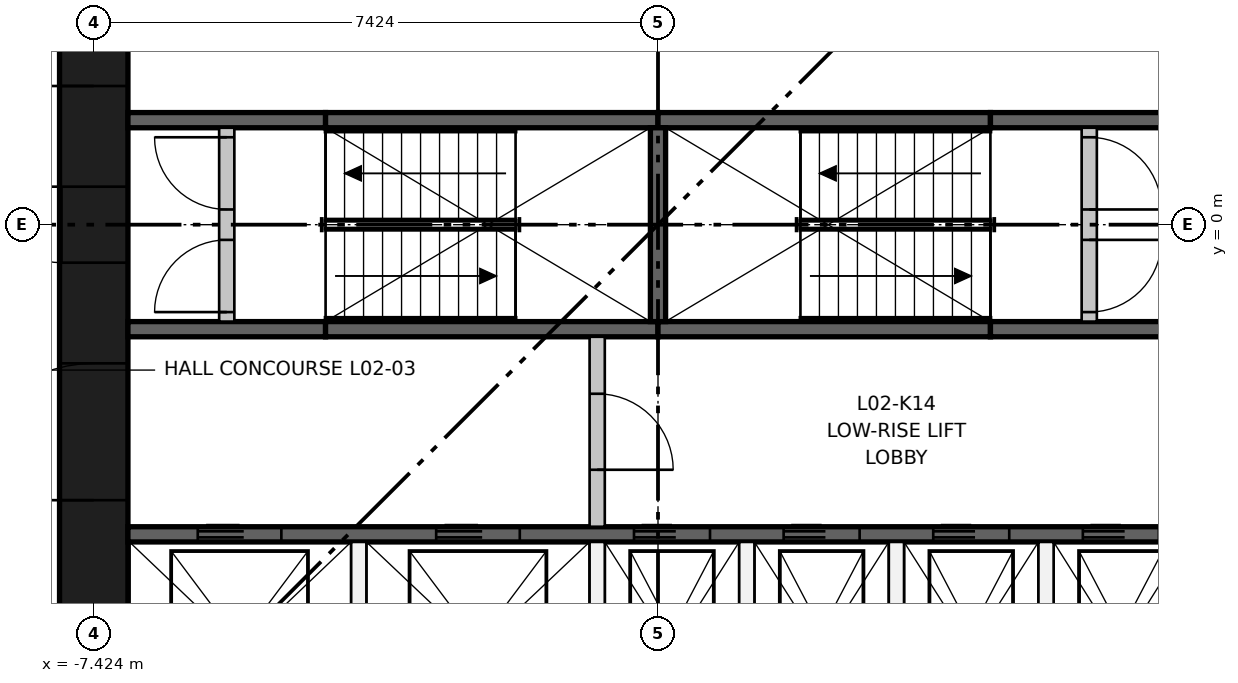
"""IFC4 building model, lengths in metres.
Left out: names, types, materials, properties, quantities, classifications, styles, units other than length and angle.
Written with IfcOpenShell. Run it as: python <this file> out.ifc"""

import sys

from ifc_helpers import new_model, si_unit, direction, frame, frame_2d, origin, place, context, subcontext, project, spatial, rectangle, extrude, element, fill, save


model = new_model("IFC4")
c1 = context("Model", 3, precision=1e-05, world=origin(), true_north=direction((0.0, 1.0)))
c2 = subcontext(c1, "Body", "Model", "MODEL_VIEW")
j1 = project(units=[si_unit("LENGTHUNIT", "METRE"), si_unit("PLANEANGLEUNIT", "RADIAN")], contexts=[c1])
p1 = place(None, origin())
s1 = spatial("IfcSite", under=j1, at=p1, CompositionType="ELEMENT")
p2 = place(p1, origin())
s2 = spatial("IfcBuilding", under=s1, at=p2, CompositionType="ELEMENT")
p3 = place(p2, frame((0.0, 0.0, 9.9)))
s3 = spatial("IfcBuildingStorey", under=s2, at=p3, CompositionType="ELEMENT", Elevation=9.9)
p4 = place(p3, frame((-7.424, -6.974, 0.0), z_axis=(0.0, 0.0, 1.0), x_axis=(0.0, 1.0, 0.0)))
e1 = element("IfcWall", 1, at=p4, inside=s3, PredefinedType="SHEAR", context=c2, shape_type="SweptSolid", body=[
    extrude(rectangle(XDim=13.948, YDim=0.9, at=frame_2d((6.974, 0.0))), origin(), (0.0, 0.0, 1.0), 4.5),
])
p5 = place(p4, frame((6.474, 0.0, 0.0)))
e2 = element("IfcOpeningElement", 2, at=p5, cuts=e1, PredefinedType="OPENING", context=c2, shape_type="SweptSolid", body=[
    extrude(rectangle(XDim=1.0, YDim=2.1, at=frame_2d((0.5, 1.05))), frame((0.0, 0.46, 0.0), z_axis=(0.0, -1.0, 0.0), x_axis=(1.0, 0.0, 0.0)), (0.0, 0.0, 1.0), 0.92),
])
p6 = place(p4, frame((3.35, 0.0, 0.0)))
e3 = element("IfcOpeningElement", 3, at=p6, cuts=e1, PredefinedType="OPENING", context=c2, shape_type="SweptSolid", body=[
    extrude(rectangle(XDim=1.8, YDim=2.1, at=frame_2d((0.9, 1.05))), frame((0.0, 0.46, 0.0), z_axis=(0.0, -1.0, 0.0), x_axis=(1.0, 0.0, 0.0)), (0.0, 0.0, 1.0), 0.92),
])
p7 = place(p4, frame((8.799, 0.0, 0.0)))
e4 = element("IfcOpeningElement", 4, at=p7, cuts=e1, PredefinedType="OPENING", context=c2, shape_type="SweptSolid", body=[
    extrude(rectangle(XDim=1.8, YDim=2.1, at=frame_2d((0.9, 1.05))), frame((0.0, 0.46, 0.0), z_axis=(0.0, -1.0, 0.0), x_axis=(1.0, 0.0, 0.0)), (0.0, 0.0, 1.0), 0.92),
])
p8 = place(p4, frame((11.974, 0.0, 0.0)))
e5 = element("IfcOpeningElement", 5, at=p8, cuts=e1, PredefinedType="OPENING", context=c2, shape_type="SweptSolid", body=[
    extrude(rectangle(XDim=1.0, YDim=2.1, at=frame_2d((0.5, 1.05))), frame((0.0, 0.46, 0.0), z_axis=(0.0, -1.0, 0.0), x_axis=(1.0, 0.0, 0.0)), (0.0, 0.0, 1.0), 0.92),
])
p9 = place(p3, frame((-6.974, -4.074, 0.0), z_axis=(0.0, 0.0, 1.0), x_axis=(1.0, 0.0, 0.0)))
e6 = element("IfcWall", 6, at=p9, inside=s3, PredefinedType="SHEAR", context=c2, shape_type="SweptSolid", body=[
    extrude(rectangle(XDim=13.948, YDim=0.2, at=frame_2d((6.974, 0.0))), origin(), (0.0, 0.0, 1.0), 4.1),
])
p10 = place(p9, frame((0.918, 0.0, 0.0)))
e7 = element("IfcOpeningElement", 7, at=p10, cuts=e6, PredefinedType="OPENING", context=c2, shape_type="SweptSolid", body=[
    extrude(rectangle(XDim=1.1, YDim=2.1, at=frame_2d((0.55, 1.05))), frame((0.0, 0.11, 0.0), z_axis=(0.0, -1.0, 0.0), x_axis=(1.0, 0.0, 0.0)), (0.0, 0.0, 1.0), 0.22),
])
p11 = place(p9, frame((4.055, 0.0, 0.0)))
e8 = element("IfcOpeningElement", 8, at=p11, cuts=e6, PredefinedType="OPENING", context=c2, shape_type="SweptSolid", body=[
    extrude(rectangle(XDim=1.1, YDim=2.1, at=frame_2d((0.55, 1.05))), frame((0.0, 0.11, 0.0), z_axis=(0.0, -1.0, 0.0), x_axis=(1.0, 0.0, 0.0)), (0.0, 0.0, 1.0), 0.22),
])
p12 = place(p9, frame((6.658, 0.0, 0.0)))
e9 = element("IfcOpeningElement", 9, at=p12, cuts=e6, PredefinedType="OPENING", context=c2, shape_type="SweptSolid", body=[
    extrude(rectangle(XDim=1.0, YDim=2.1, at=frame_2d((0.5, 1.05))), frame((0.0, 0.11, 0.0), z_axis=(0.0, -1.0, 0.0), x_axis=(1.0, 0.0, 0.0)), (0.0, 0.0, 1.0), 0.22),
])
p13 = place(p9, frame((8.627, 0.0, 0.0)))
e10 = element("IfcOpeningElement", 10, at=p13, cuts=e6, PredefinedType="OPENING", context=c2, shape_type="SweptSolid", body=[
    extrude(rectangle(XDim=1.0, YDim=2.1, at=frame_2d((0.5, 1.05))), frame((0.0, 0.11, 0.0), z_axis=(0.0, -1.0, 0.0), x_axis=(1.0, 0.0, 0.0)), (0.0, 0.0, 1.0), 0.22),
])
p14 = place(p9, frame((10.595, 0.0, 0.0)))
e11 = element("IfcOpeningElement", 11, at=p14, cuts=e6, PredefinedType="OPENING", context=c2, shape_type="SweptSolid", body=[
    extrude(rectangle(XDim=1.0, YDim=2.1, at=frame_2d((0.5, 1.05))), frame((0.0, 0.11, 0.0), z_axis=(0.0, -1.0, 0.0), x_axis=(1.0, 0.0, 0.0)), (0.0, 0.0, 1.0), 0.22),
])
p15 = place(p9, frame((12.564, 0.0, 0.0)))
e12 = element("IfcOpeningElement", 12, at=p15, cuts=e6, PredefinedType="OPENING", context=c2, shape_type="SweptSolid", body=[
    extrude(rectangle(XDim=1.0, YDim=2.1, at=frame_2d((0.5, 1.05))), frame((0.0, 0.11, 0.0), z_axis=(0.0, -1.0, 0.0), x_axis=(1.0, 0.0, 0.0)), (0.0, 0.0, 1.0), 0.22),
])
p16 = place(p3, frame((-6.974, -1.375, 0.0), z_axis=(0.0, 0.0, 1.0), x_axis=(1.0, 0.0, 0.0)))
e13 = element("IfcWall", 13, at=p16, inside=s3, PredefinedType="SHEAR", context=c2, shape_type="SweptSolid", body=[
    extrude(rectangle(XDim=2.6, YDim=0.2, at=frame_2d((1.3, 0.0))), origin(), (0.0, 0.0, 1.0), 4.1),
])
for number, where, z_axis, x_axis in (
    (14, (-4.374, -1.375, 0.0), (0.0, 0.0, 1.0), (1.0, 0.0, 0.0)),
    (15, (0.0, -1.375, 0.0), (0.0, 0.0, 1.0), (1.0, 0.0, 0.0)),
):
    element("IfcWall", number, at=place(p3, frame(where, z_axis=z_axis, x_axis=x_axis)), inside=s3, PredefinedType="SHEAR", context=c2, shape_type="SweptSolid", body=[
        extrude(rectangle(XDim=4.374, YDim=0.2, at=frame_2d((2.187, 0.0))), origin(), (0.0, 0.0, 1.0), 4.1),
    ])
for number, where, z_axis, x_axis in (
    (16, (4.374, -1.375, 0.0), (0.0, 0.0, 1.0), (1.0, 0.0, 0.0)),
    (17, (-6.974, 1.375, 0.0), (0.0, 0.0, 1.0), (1.0, 0.0, 0.0)),
):
    element("IfcWall", number, at=place(p3, frame(where, z_axis=z_axis, x_axis=x_axis)), inside=s3, PredefinedType="SHEAR", context=c2, shape_type="SweptSolid", body=[
        extrude(rectangle(XDim=2.6, YDim=0.2, at=frame_2d((1.3, 0.0))), origin(), (0.0, 0.0, 1.0), 4.1),
    ])
for number, where, z_axis, x_axis in (
    (18, (-4.374, 1.375, 0.0), (0.0, 0.0, 1.0), (1.0, 0.0, 0.0)),
    (19, (0.0, 1.375, 0.0), (0.0, 0.0, 1.0), (1.0, 0.0, 0.0)),
):
    element("IfcWall", number, at=place(p3, frame(where, z_axis=z_axis, x_axis=x_axis)), inside=s3, PredefinedType="SHEAR", context=c2, shape_type="SweptSolid", body=[
        extrude(rectangle(XDim=4.374, YDim=0.2, at=frame_2d((2.187, 0.0))), origin(), (0.0, 0.0, 1.0), 4.1),
    ])
p17 = place(p3, frame((4.374, 1.375, 0.0), z_axis=(0.0, 0.0, 1.0), x_axis=(1.0, 0.0, 0.0)))
e20 = element("IfcWall", 20, at=p17, inside=s3, PredefinedType="SHEAR", context=c2, shape_type="SweptSolid", body=[
    extrude(rectangle(XDim=2.6, YDim=0.2, at=frame_2d((1.3, 0.0))), origin(), (0.0, 0.0, 1.0), 4.1),
])
p18 = place(p3, frame((0.0, -1.275, 0.0), z_axis=(0.0, 0.0, 1.0), x_axis=(0.0, 1.0, 0.0)))
e21 = element("IfcWall", 21, at=p18, inside=s3, PredefinedType="SHEAR", context=c2, shape_type="SweptSolid", body=[
    extrude(rectangle(XDim=2.55, YDim=0.2, at=frame_2d((1.275, 0.0))), origin(), (0.0, 0.0, 1.0), 4.1),
])
for number, where, z_axis, x_axis in (
    (22, (-3.937, -6.974, 0.0), (0.0, 0.0, 1.0), (0.0, 1.0, 0.0)),
    (23, (-0.8, -6.974, 0.0), (0.0, 0.0, 1.0), (0.0, 1.0, 0.0)),
):
    element("IfcWall", number, at=place(p3, frame(where, z_axis=z_axis, x_axis=x_axis)), inside=s3, PredefinedType="PARTITIONING", context=c2, shape_type="SweptSolid", body=[
        extrude(rectangle(XDim=2.8, YDim=0.2, at=frame_2d((1.4, 0.0))), origin(), (0.0, 0.0, 1.0), 4.1),
    ])
p19 = place(p3, frame((-0.8, -3.974, 0.0), z_axis=(0.0, 0.0, 1.0), x_axis=(0.0, 1.0, 0.0)))
e24 = element("IfcWall", 24, at=p19, inside=s3, PredefinedType="PARTITIONING", context=c2, shape_type="SweptSolid", body=[
    extrude(rectangle(XDim=2.499, YDim=0.2, at=frame_2d((1.25, 0.0))), origin(), (0.0, 0.0, 1.0), 4.1),
])
p20 = place(p19, frame((0.75, 0.0, 0.0)))
e25 = element("IfcOpeningElement", 25, at=p20, cuts=e24, PredefinedType="OPENING", context=c2, shape_type="SweptSolid", body=[
    extrude(rectangle(XDim=1.0, YDim=2.1, at=frame_2d((0.5, 1.05))), frame((0.0, 0.11, 0.0), z_axis=(0.0, -1.0, 0.0), x_axis=(1.0, 0.0, 0.0)), (0.0, 0.0, 1.0), 0.22),
])
for number, where, z_axis, x_axis in (
    (26, (1.168, -6.974, 0.0), (0.0, 0.0, 1.0), (0.0, 1.0, 0.0)),
    (27, (3.137, -6.974, 0.0), (0.0, 0.0, 1.0), (0.0, 1.0, 0.0)),
    (28, (5.105, -6.974, 0.0), (0.0, 0.0, 1.0), (0.0, 1.0, 0.0)),
):
    element("IfcWall", number, at=place(p3, frame(where, z_axis=z_axis, x_axis=x_axis)), inside=s3, PredefinedType="PARTITIONING", context=c2, shape_type="SweptSolid", body=[
        extrude(rectangle(XDim=2.8, YDim=0.2, at=frame_2d((1.4, 0.0))), origin(), (0.0, 0.0, 1.0), 4.1),
    ])
p21 = place(p3, frame((-5.674, -1.275, 0.0), z_axis=(0.0, 0.0, 1.0), x_axis=(0.0, 1.0, 0.0)))
e29 = element("IfcWall", 29, at=p21, inside=s3, PredefinedType="PARTITIONING", context=c2, shape_type="SweptSolid", body=[
    extrude(rectangle(XDim=2.55, YDim=0.2, at=frame_2d((1.275, 0.0))), origin(), (0.0, 0.0, 1.0), 4.1),
])
p22 = place(p21, frame((0.125, 0.0, 0.0)))
e30 = element("IfcOpeningElement", 30, at=p22, cuts=e29, PredefinedType="OPENING", context=c2, shape_type="SweptSolid", body=[
    extrude(rectangle(XDim=0.95, YDim=2.1, at=frame_2d((0.475, 1.05))), frame((0.0, 0.11, 0.0), z_axis=(0.0, -1.0, 0.0), x_axis=(1.0, 0.0, 0.0)), (0.0, 0.0, 1.0), 0.22),
])
p23 = place(p21, frame((1.475, 0.0, 0.0)))
e31 = element("IfcOpeningElement", 31, at=p23, cuts=e29, PredefinedType="OPENING", context=c2, shape_type="SweptSolid", body=[
    extrude(rectangle(XDim=0.95, YDim=2.1, at=frame_2d((0.475, 1.05))), frame((0.0, 0.11, 0.0), z_axis=(0.0, -1.0, 0.0), x_axis=(1.0, 0.0, 0.0)), (0.0, 0.0, 1.0), 0.22),
])
p24 = place(p3, frame((5.674, -1.275, 0.0), z_axis=(0.0, 0.0, 1.0), x_axis=(0.0, 1.0, 0.0)))
e32 = element("IfcWall", 32, at=p24, inside=s3, PredefinedType="PARTITIONING", context=c2, shape_type="SweptSolid", body=[
    extrude(rectangle(XDim=2.55, YDim=0.2, at=frame_2d((1.275, 0.0))), origin(), (0.0, 0.0, 1.0), 4.1),
])
p25 = place(p24, frame((0.125, 0.0, 0.0)))
e33 = element("IfcOpeningElement", 33, at=p25, cuts=e32, PredefinedType="OPENING", context=c2, shape_type="SweptSolid", body=[
    extrude(rectangle(XDim=0.95, YDim=2.1, at=frame_2d((0.475, 1.05))), frame((0.0, 0.11, 0.0), z_axis=(0.0, -1.0, 0.0), x_axis=(1.0, 0.0, 0.0)), (0.0, 0.0, 1.0), 0.22),
])
p26 = place(p24, frame((1.475, 0.0, 0.0)))
e34 = element("IfcOpeningElement", 34, at=p26, cuts=e32, PredefinedType="OPENING", context=c2, shape_type="SweptSolid", body=[
    extrude(rectangle(XDim=0.95, YDim=2.1, at=frame_2d((0.475, 1.05))), frame((0.0, 0.11, 0.0), z_axis=(0.0, -1.0, 0.0), x_axis=(1.0, 0.0, 0.0)), (0.0, 0.0, 1.0), 0.22),
])
p27 = place(p10, origin())
e35 = element("IfcDoor", 35, at=p27, inside=s3, OperationType="DOUBLE_DOOR_SLIDING", PredefinedType="DOOR", context=c2, shape_type="SweptSolid", body=[
    extrude(rectangle(XDim=1.1, YDim=2.1, at=frame_2d((0.55, 1.05))), frame((0.0, 0.025, 0.0), z_axis=(0.0, -1.0, 0.0), x_axis=(1.0, 0.0, 0.0)), (0.0, 0.0, 1.0), 0.05),
])
fill(e7, e35)
p28 = place(p11, origin())
e36 = element("IfcDoor", 36, at=p28, inside=s3, OperationType="DOUBLE_DOOR_SLIDING", PredefinedType="DOOR", context=c2, shape_type="SweptSolid", body=[
    extrude(rectangle(XDim=1.1, YDim=2.1, at=frame_2d((0.55, 1.05))), frame((0.0, 0.025, 0.0), z_axis=(0.0, -1.0, 0.0), x_axis=(1.0, 0.0, 0.0)), (0.0, 0.0, 1.0), 0.05),
])
fill(e8, e36)
p29 = place(p12, origin())
e37 = element("IfcDoor", 37, at=p29, inside=s3, OperationType="DOUBLE_DOOR_SLIDING", PredefinedType="DOOR", context=c2, shape_type="SweptSolid", body=[
    extrude(rectangle(XDim=1.0, YDim=2.1, at=frame_2d((0.5, 1.05))), frame((0.0, 0.025, 0.0), z_axis=(0.0, -1.0, 0.0), x_axis=(1.0, 0.0, 0.0)), (0.0, 0.0, 1.0), 0.05),
])
fill(e9, e37)
p30 = place(p13, origin())
e38 = element("IfcDoor", 38, at=p30, inside=s3, OperationType="DOUBLE_DOOR_SLIDING", PredefinedType="DOOR", context=c2, shape_type="SweptSolid", body=[
    extrude(rectangle(XDim=1.0, YDim=2.1, at=frame_2d((0.5, 1.05))), frame((0.0, 0.025, 0.0), z_axis=(0.0, -1.0, 0.0), x_axis=(1.0, 0.0, 0.0)), (0.0, 0.0, 1.0), 0.05),
])
fill(e10, e38)
p31 = place(p14, origin())
e39 = element("IfcDoor", 39, at=p31, inside=s3, OperationType="DOUBLE_DOOR_SLIDING", PredefinedType="DOOR", context=c2, shape_type="SweptSolid", body=[
    extrude(rectangle(XDim=1.0, YDim=2.1, at=frame_2d((0.5, 1.05))), frame((0.0, 0.025, 0.0), z_axis=(0.0, -1.0, 0.0), x_axis=(1.0, 0.0, 0.0)), (0.0, 0.0, 1.0), 0.05),
])
fill(e11, e39)
p32 = place(p15, origin())
e40 = element("IfcDoor", 40, at=p32, inside=s3, OperationType="DOUBLE_DOOR_SLIDING", PredefinedType="DOOR", context=c2, shape_type="SweptSolid", body=[
    extrude(rectangle(XDim=1.0, YDim=2.1, at=frame_2d((0.5, 1.05))), frame((0.0, 0.025, 0.0), z_axis=(0.0, -1.0, 0.0), x_axis=(1.0, 0.0, 0.0)), (0.0, 0.0, 1.0), 0.05),
])
fill(e12, e40)
p33 = place(p22, origin())
e41 = element("IfcDoor", 41, at=p33, inside=s3, OperationType="SINGLE_SWING_LEFT", PredefinedType="DOOR", context=c2, shape_type="SweptSolid", body=[
    extrude(rectangle(XDim=0.95, YDim=2.1, at=frame_2d((0.475, 1.05))), frame((0.0, 0.025, 0.0), z_axis=(0.0, -1.0, 0.0), x_axis=(1.0, 0.0, 0.0)), (0.0, 0.0, 1.0), 0.05),
])
fill(e30, e41)
p34 = place(p23, origin())
e42 = element("IfcDoor", 42, at=p34, inside=s3, OperationType="SINGLE_SWING_RIGHT", PredefinedType="DOOR", context=c2, shape_type="SweptSolid", body=[
    extrude(rectangle(XDim=0.95, YDim=2.1, at=frame_2d((0.475, 1.05))), frame((0.0, 0.025, 0.0), z_axis=(0.0, -1.0, 0.0), x_axis=(1.0, 0.0, 0.0)), (0.0, 0.0, 1.0), 0.05),
])
fill(e31, e42)
p35 = place(p25, frame((0.95, 0.0, 0.0), z_axis=(0.0, 0.0, 1.0), x_axis=(-1.0, 0.0, 0.0)))
e43 = element("IfcDoor", 43, at=p35, inside=s3, OperationType="SINGLE_SWING_RIGHT", PredefinedType="DOOR", context=c2, shape_type="SweptSolid", body=[
    extrude(rectangle(XDim=0.95, YDim=2.1, at=frame_2d((0.475, 1.05))), frame((0.0, 0.025, 0.0), z_axis=(0.0, -1.0, 0.0), x_axis=(1.0, 0.0, 0.0)), (0.0, 0.0, 1.0), 0.05),
])
fill(e33, e43)
p36 = place(p26, frame((0.95, 0.0, 0.0), z_axis=(0.0, 0.0, 1.0), x_axis=(-1.0, 0.0, 0.0)))
e44 = element("IfcDoor", 44, at=p36, inside=s3, OperationType="SINGLE_SWING_LEFT", PredefinedType="DOOR", context=c2, shape_type="SweptSolid", body=[
    extrude(rectangle(XDim=0.95, YDim=2.1, at=frame_2d((0.475, 1.05))), frame((0.0, 0.025, 0.0), z_axis=(0.0, -1.0, 0.0), x_axis=(1.0, 0.0, 0.0)), (0.0, 0.0, 1.0), 0.05),
])
fill(e34, e44)
p37 = place(p20, frame((1.0, 0.0, 0.0), z_axis=(0.0, 0.0, 1.0), x_axis=(-1.0, 0.0, 0.0)))
e45 = element("IfcDoor", 45, at=p37, inside=s3, OperationType="SINGLE_SWING_LEFT", PredefinedType="DOOR", context=c2, shape_type="SweptSolid", body=[
    extrude(rectangle(XDim=1.0, YDim=2.1, at=frame_2d((0.5, 1.05))), frame((0.0, 0.025, 0.0), z_axis=(0.0, -1.0, 0.0), x_axis=(1.0, 0.0, 0.0)), (0.0, 0.0, 1.0), 0.05),
])
fill(e25, e45)
p38 = place(p5, origin())
e46 = element("IfcDoor", 46, at=p38, inside=s3, OperationType="SINGLE_SWING_RIGHT", PredefinedType="DOOR", context=c2, shape_type="SweptSolid", body=[
    extrude(rectangle(XDim=1.0, YDim=2.1, at=frame_2d((0.5, 1.05))), frame((0.0, 0.45, 0.0), z_axis=(0.0, -1.0, 0.0), x_axis=(1.0, 0.0, 0.0)), (0.0, 0.0, 1.0), 0.05),
])
fill(e2, e46)
p39 = place(p6, origin())
e47 = element("IfcDoor", 47, at=p39, inside=s3, OperationType="DOUBLE_DOOR_SINGLE_SWING", PredefinedType="DOOR", context=c2, shape_type="SweptSolid", body=[
    extrude(rectangle(XDim=1.8, YDim=2.1, at=frame_2d((0.9, 1.05))), frame((0.0, 0.025, 0.0), z_axis=(0.0, -1.0, 0.0), x_axis=(1.0, 0.0, 0.0)), (0.0, 0.0, 1.0), 0.05),
])
fill(e3, e47)
p40 = place(p7, origin())
e48 = element("IfcDoor", 48, at=p40, inside=s3, OperationType="DOUBLE_DOOR_SINGLE_SWING", PredefinedType="DOOR", context=c2, shape_type="SweptSolid", body=[
    extrude(rectangle(XDim=1.8, YDim=2.1, at=frame_2d((0.9, 1.05))), frame((0.0, 0.025, 0.0), z_axis=(0.0, -1.0, 0.0), x_axis=(1.0, 0.0, 0.0)), (0.0, 0.0, 1.0), 0.05),
])
fill(e4, e48)
save(model, sys.argv[1])
